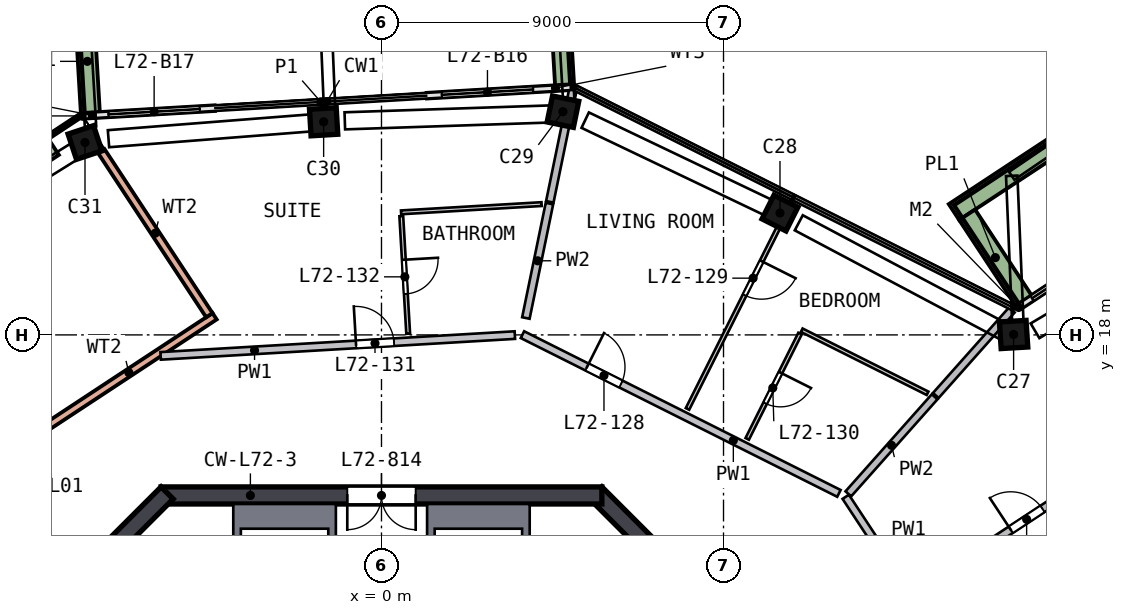
"""IFC4 building model, lengths in metres.
Left out: names, types, materials, properties, quantities, classifications, styles, units other than length and angle.
Written with IfcOpenShell. Run it as: python <this file> out.ifc"""

import sys

from ifc_helpers import new_model, si_unit, direction, frame, frame_2d, origin, origin_2d, place, context, subcontext, project, spatial, polyline, rectangle, outline, extrude, element, fill, save


model = new_model("IFC4")
c1 = context("Model", 3, precision=1e-05, world=origin(), true_north=direction((0.0, 1.0)))
c2 = subcontext(c1, "Body", "Model", "MODEL_VIEW")
j1 = project(units=[si_unit("LENGTHUNIT", "METRE"), si_unit("PLANEANGLEUNIT", "RADIAN")], contexts=[c1])
p1 = place(None, origin())
s1 = spatial("IfcSite", under=j1, at=p1, CompositionType="ELEMENT")
p2 = place(p1, origin())
s2 = spatial("IfcBuilding", under=s1, at=p2, CompositionType="ELEMENT")
p3 = place(p2, frame((0.0, 0.0, 291.5)))
s3 = spatial("IfcBuildingStorey", under=s2, at=p3, CompositionType="ELEMENT", Elevation=291.5)
p4 = place(p3, frame((16.737, 17.916, 0.0), z_axis=(-0.085818315, 0.078901161, 0.993181667), x_axis=(0.994621215, 0.064815395, 0.080793584)))
e1 = element("IfcColumn", 1, at=p4, inside=s3, PredefinedType="COLUMN", context=c2, shape_type="SweptSolid", body=[
    extrude(rectangle(XDim=0.7, YDim=0.7, at=origin_2d()), origin(), (0.0, 0.0, 1.0), 3.212),
])
p5 = place(p3, frame((10.608, 21.147, 0.0), z_axis=(-0.100992141, 0.049659539, 0.993647079), x_axis=(-0.88792749, 0.446004698, -0.112537025)))
e2 = element("IfcColumn", 2, at=p5, inside=s3, PredefinedType="COLUMN", context=c2, shape_type="SweptSolid", body=[
    extrude(rectangle(XDim=0.7, YDim=0.7, at=origin_2d()), origin(), (0.0, 0.0, 1.0), 3.21),
])
p6 = place(p3, frame((4.913, 23.847, 0.0), z_axis=(-0.113648817, 0.022425686, 0.993267857), x_axis=(0.972810168, -0.200555144, 0.115836137)))
e3 = element("IfcColumn", 3, at=p6, inside=s3, PredefinedType="COLUMN", context=c2, shape_type="SweptSolid", body=[
    extrude(rectangle(XDim=0.7, YDim=0.7, at=origin_2d()), origin(), (0.0, 0.0, 1.0), 3.212),
])
p7 = place(p3, frame((-1.387, 23.618, 0.0), z_axis=(-0.112247814, -0.007528817, 0.993651722), x_axis=(-0.991953134, -0.058082911, -0.112496023)))
e4 = element("IfcColumn", 4, at=p7, inside=s3, PredefinedType="COLUMN", context=c2, shape_type="SweptSolid", body=[
    extrude(rectangle(XDim=0.7, YDim=0.7, at=origin_2d()), origin(), (0.0, 0.0, 1.0), 3.21),
])
p8 = place(p3, frame((-7.669, 23.109, 0.0), z_axis=(-0.109619993, -0.037401551, 0.993269642), x_axis=(0.942748169, 0.312748183, 0.11582083)))
e5 = element("IfcColumn", 5, at=p8, inside=s3, PredefinedType="COLUMN", context=c2, shape_type="SweptSolid", body=[
    extrude(rectangle(XDim=0.7, YDim=0.7, at=origin_2d()), origin(), (0.0, 0.0, 1.0), 3.212),
])
p9 = place(p3, frame((13.841, 5.64, 0.0), z_axis=(0.0, 0.0, 1.0), x_axis=(-0.707106781, 0.707106781, 0.0)))
e6 = element("IfcWall", 6, at=p9, inside=s3, PredefinedType="SHEAR", context=c2, shape_type="SweptSolid", body=[
    extrude(rectangle(XDim=11.598, YDim=0.45, at=frame_2d((5.799, 0.0))), origin(), (0.0, 0.0, 1.0), 3.5),
])
p10 = place(p9, frame((2.099, 0.0, 0.0)))
e7 = element("IfcOpeningElement", 7, at=p10, cuts=e6, PredefinedType="OPENING", context=c2, shape_type="SweptSolid", body=[
    extrude(rectangle(XDim=1.2, YDim=2.1, at=frame_2d((0.6, 1.05))), frame((0.0, 0.235, 0.0), z_axis=(0.0, -1.0, 0.0), x_axis=(1.0, 0.0, 0.0)), (0.0, 0.0, 1.0), 0.47),
])
p11 = place(p3, frame((5.799, 13.775, 0.0), z_axis=(0.0, 0.0, 1.0), x_axis=(-1.0, 0.0, 0.0)))
e8 = element("IfcWall", 8, at=p11, inside=s3, PredefinedType="SHEAR", context=c2, shape_type="SweptSolid", body=[
    extrude(rectangle(XDim=11.598, YDim=0.45, at=frame_2d((5.799, 0.0))), origin(), (0.0, 0.0, 1.0), 3.5),
])
p12 = place(p11, frame((4.899, 0.0, 0.0)))
e9 = element("IfcOpeningElement", 9, at=p12, cuts=e8, PredefinedType="OPENING", context=c2, shape_type="SweptSolid", body=[
    extrude(rectangle(XDim=1.8, YDim=2.1, at=frame_2d((0.9, 1.05))), frame((0.0, 0.235, 0.0), z_axis=(0.0, -1.0, 0.0), x_axis=(1.0, 0.0, 0.0)), (0.0, 0.0, 1.0), 0.47),
])
p13 = place(p3, frame((-5.64, 13.841, 0.0), z_axis=(0.0, 0.0, 1.0), x_axis=(-0.707106781, -0.707106781, 0.0)))
e10 = element("IfcWall", 10, at=p13, inside=s3, PredefinedType="SHEAR", context=c2, shape_type="SweptSolid", body=[
    extrude(rectangle(XDim=11.598, YDim=0.45, at=frame_2d((5.799, 0.0))), origin(), (0.0, 0.0, 1.0), 3.5),
])
p14 = place(p3, frame((19.459, 20.504, 0.0), z_axis=(0.0, 0.0, 1.0), x_axis=(-0.83522898, -0.54990231, 0.0)))
e11 = element("IfcWall", 11, at=p14, inside=s3, PredefinedType="SOLIDWALL", context=c2, shape_type="SweptSolid", body=[
    extrude(rectangle(XDim=3.2, YDim=0.15, at=frame_2d((1.6, 0.0))), origin(), (0.0, 0.0, 1.0), 2.525),
])
p15 = place(p14, frame((0.4, 0.0, 0.0)))
e12 = element("IfcOpeningElement", 12, at=p15, cuts=e11, PredefinedType="OPENING", context=c2, shape_type="SweptSolid", body=[
    extrude(rectangle(XDim=2.4, YDim=2.4, at=frame_2d((1.2, 1.2))), frame((0.0, 0.085, 0.0), z_axis=(0.0, -1.0, 0.0), x_axis=(1.0, 0.0, 0.0)), (0.0, 0.0, 1.0), 0.17),
])
p16 = place(p3, frame((4.971, 24.517, 0.0), z_axis=(0.0, 0.0, 1.0), x_axis=(-0.998281258, -0.058604861, 0.0)))
e13 = element("IfcWall", 13, at=p16, inside=s3, PredefinedType="SOLIDWALL", context=c2, shape_type="SweptSolid", body=[
    extrude(rectangle(XDim=3.787, YDim=0.15, at=frame_2d((1.894, 0.0))), origin(), (0.0, 0.0, 1.0), 2.525),
])
p17 = place(p16, frame((0.987, 0.0, 0.0)))
e14 = element("IfcOpeningElement", 14, at=p17, cuts=e13, PredefinedType="OPENING", context=c2, shape_type="SweptSolid", body=[
    extrude(rectangle(XDim=2.4, YDim=2.4, at=frame_2d((1.2, 1.2))), frame((0.0, 0.085, 0.0), z_axis=(0.0, -1.0, 0.0), x_axis=(1.0, 0.0, 0.0)), (0.0, 0.0, 1.0), 0.17),
])
p18 = place(p3, frame((-4.385, 23.968, 0.0), z_axis=(0.0, 0.0, 1.0), x_axis=(-0.998282135, -0.058589922, 0.0)))
e15 = element("IfcWall", 15, at=p18, inside=s3, PredefinedType="SOLIDWALL", context=c2, shape_type="SweptSolid", body=[
    extrude(rectangle(XDim=3.467, YDim=0.15, at=frame_2d((1.733, 0.0))), origin(), (0.0, 0.0, 1.0), 2.525),
])
p19 = place(p18, frame((0.4, 0.0, 0.0)))
e16 = element("IfcOpeningElement", 16, at=p19, cuts=e15, PredefinedType="OPENING", context=c2, shape_type="SweptSolid", body=[
    extrude(rectangle(XDim=2.4, YDim=2.4, at=frame_2d((1.2, 1.2))), frame((0.0, 0.085, 0.0), z_axis=(0.0, -1.0, 0.0), x_axis=(1.0, 0.0, 0.0)), (0.0, 0.0, 1.0), 0.17),
])
p20 = place(p3, frame((27.633, 29.507, 0.0), z_axis=(0.0, 0.0, 1.0), x_axis=(-0.835233933, -0.549894788, 0.0)))
e17 = element("IfcWall", 17, at=p20, inside=s3, PredefinedType="SOLIDWALL", context=c2, shape_type="SweptSolid", body=[
    extrude(rectangle(XDim=15.048, YDim=0.5, at=frame_2d((7.524, 0.0))), origin(), (0.0, 0.0, 1.0), 0.7),
])
p21 = place(p3, frame((15.411, 21.161, 0.0), z_axis=(0.0, 0.0, 1.0), x_axis=(0.549910541, -0.835223561, 0.0)))
e18 = element("IfcWall", 18, at=p21, inside=s3, PredefinedType="SOLIDWALL", context=c2, shape_type="SweptSolid", body=[
    extrude(rectangle(XDim=2.699, YDim=0.5, at=frame_2d((1.35, 0.0))), origin(), (0.0, 0.0, 1.0), 0.7),
])
p22 = place(p3, frame((4.817, 24.584, 0.0), z_axis=(0.0, 0.0, 1.0), x_axis=(-0.058614646, 0.998280684, 0.0)))
e19 = element("IfcWall", 19, at=p22, inside=s3, PredefinedType="SOLIDWALL", context=c2, shape_type="SweptSolid", body=[
    extrude(rectangle(XDim=3.199, YDim=0.5, at=frame_2d((1.6, 0.0))), origin(), (0.0, 0.0, 1.0), 0.7),
])
p23 = place(p3, frame((-7.819, 26.546, 0.0), z_axis=(0.0, 0.0, 1.0), x_axis=(0.058615969, -0.998280606, 0.0)))
e20 = element("IfcWall", 20, at=p23, inside=s3, PredefinedType="SOLIDWALL", context=c2, shape_type="SweptSolid", body=[
    extrude(rectangle(XDim=2.699, YDim=0.5, at=frame_2d((1.35, 0.0))), origin(), (0.0, 0.0, 1.0), 0.7),
])
p24 = place(p3, frame((-15.249, 11.342, 0.0), z_axis=(0.0, 0.0, 1.0), x_axis=(0.835229141, 0.549902066, 0.0)))
e21 = element("IfcWall", 21, at=p24, inside=s3, PredefinedType="SOLIDWALL", context=c2, shape_type="SweptSolid", body=[
    extrude(rectangle(XDim=13.0, YDim=0.2, at=frame_2d((6.5, 0.0))), origin(), (0.0, 0.0, 1.0), 3.19),
])
p25 = place(p24, frame((5.6, 0.0, 0.0)))
e22 = element("IfcOpeningElement", 22, at=p25, cuts=e21, PredefinedType="OPENING", context=c2, shape_type="SweptSolid", body=[
    extrude(rectangle(XDim=1.8, YDim=2.4, at=frame_2d((0.9, 1.2))), frame((0.0, 0.11, 0.0), z_axis=(0.0, -1.0, 0.0), x_axis=(1.0, 0.0, 0.0)), (0.0, 0.0, 1.0), 0.22),
])
p26 = place(p3, frame((-7.373, 22.837, 0.0), z_axis=(0.0, 0.0, 1.0), x_axis=(0.549907016, -0.835225882, 0.0)))
e23 = element("IfcWall", 23, at=p26, inside=s3, PredefinedType="SOLIDWALL", context=c2, shape_type="SweptSolid", body=[
    extrude(rectangle(XDim=5.17, YDim=0.2, at=frame_2d((2.585, 0.0))), origin(), (0.0, 0.0, 1.0), 3.19),
])
p27 = place(p3, frame((-7.95, 23.75, 0.0), z_axis=(0.0, 0.0, 1.0), x_axis=(-0.83522795, -0.549903875, 0.0)))
e24 = element("IfcWall", 24, at=p27, inside=s3, PredefinedType="SOLIDWALL", context=c2, shape_type="SweptSolid", body=[
    extrude(rectangle(XDim=12.84, YDim=0.1, at=frame_2d((6.42, 0.0))), origin(), (0.0, 0.0, 1.0), 0.7),
])
p28 = place(p3, frame((-8.626, 22.946, 0.0), z_axis=(0.0, 0.0, 1.0), x_axis=(-0.835245259, -0.549877584, 0.0)))
e25 = element("IfcWall", 25, at=p28, inside=s3, PredefinedType="SOLIDWALL", context=c2, shape_type="SweptSolid", body=[
    extrude(rectangle(XDim=4.963, YDim=0.5, at=frame_2d((2.481, 0.0))), origin(), (0.0, 0.0, 1.0), 0.7),
])
p29 = place(p3, origin())
e26 = element("IfcWall", 26, at=p29, inside=s3, PredefinedType="SOLIDWALL", context=c2, shape_type="SweptSolid", body=[
    extrude(outline(polyline([(3.9, 9.9), (3.7, 9.9), (3.7, 12.9), (1.4, 12.9), (1.4, 9.9), (1.2, 9.9), (1.2, 13.55), (3.9, 13.55), (3.9, 9.9)])), origin(), (0.0, 0.0, 1.0), 3.19),
])
p30 = place(p3, origin())
e27 = element("IfcWall", 27, at=p30, inside=s3, PredefinedType="SOLIDWALL", context=c2, shape_type="SweptSolid", body=[
    extrude(outline(polyline([(-3.9, 13.55), (-1.2, 13.55), (-1.2, 9.9), (-1.4, 9.9), (-1.4, 12.9), (-3.7, 12.9), (-3.7, 9.9), (-3.9, 9.9), (-3.9, 13.55)])), origin(), (0.0, 0.0, 1.0), 3.19),
])
p31 = place(p3, frame((-5.811, 17.448, 0.0), z_axis=(0.0, 0.0, 1.0), x_axis=(0.998279959, 0.058626982, 0.0)))
e28 = element("IfcWall", 28, at=p31, inside=s3, PredefinedType="SOLIDWALL", context=c2, shape_type="SweptSolid", body=[
    extrude(rectangle(XDim=9.336, YDim=0.2, at=frame_2d((4.668, 0.0))), origin(), (0.0, 0.0, 1.0), 3.19),
])
p32 = place(p31, frame((5.15, 0.0, 0.0)))
e29 = element("IfcOpeningElement", 29, at=p32, cuts=e28, PredefinedType="OPENING", context=c2, shape_type="SweptSolid", body=[
    extrude(rectangle(XDim=1.0, YDim=2.1, at=frame_2d((0.5, 1.05))), frame((0.0, 0.11, 0.0), z_axis=(0.0, -1.0, 0.0), x_axis=(1.0, 0.0, 0.0)), (0.0, 0.0, 1.0), 0.22),
])
p33 = place(p3, frame((3.709, 18.007, 0.0), z_axis=(0.0, 0.0, 1.0), x_axis=(0.893855207, -0.448355739, 0.0)))
e30 = element("IfcWall", 30, at=p33, inside=s3, PredefinedType="SOLIDWALL", context=c2, shape_type="SweptSolid", body=[
    extrude(rectangle(XDim=9.317, YDim=0.2, at=frame_2d((4.658, 0.0))), origin(), (0.0, 0.0, 1.0), 3.19),
])
p34 = place(p33, frame((1.9, 0.0, 0.0)))
e31 = element("IfcOpeningElement", 31, at=p34, cuts=e30, PredefinedType="OPENING", context=c2, shape_type="SweptSolid", body=[
    extrude(rectangle(XDim=1.0, YDim=2.1, at=frame_2d((0.5, 1.05))), frame((0.0, 0.11, 0.0), z_axis=(0.0, -1.0, 0.0), x_axis=(1.0, 0.0, 0.0)), (0.0, 0.0, 1.0), 0.22),
])
p35 = place(p3, frame((12.216, 13.74, 0.0), z_axis=(0.0, 0.0, 1.0), x_axis=(0.549889366, -0.835237502, 0.0)))
e32 = element("IfcWall", 32, at=p35, inside=s3, PredefinedType="SOLIDWALL", context=c2, shape_type="SweptSolid", body=[
    extrude(rectangle(XDim=9.316, YDim=0.2, at=frame_2d((4.658, 0.0))), origin(), (0.0, 0.0, 1.0), 3.19),
])
p36 = place(p35, frame((3.863, 0.0, 0.0)))
e33 = element("IfcOpeningElement", 33, at=p36, cuts=e32, PredefinedType="OPENING", context=c2, shape_type="SweptSolid", body=[
    extrude(rectangle(XDim=1.8, YDim=2.1, at=frame_2d((0.9, 1.05))), frame((0.0, 0.11, 0.0), z_axis=(0.0, -1.0, 0.0), x_axis=(1.0, 0.0, 0.0)), (0.0, 0.0, 1.0), 0.22),
])
p37 = place(p3, frame((3.8, 18.445, 0.0), z_axis=(0.0, 0.0, 1.0), x_axis=(0.20174701, 0.979437667, 0.0)))
e34 = element("IfcWall", 34, at=p37, inside=s3, PredefinedType="SOLIDWALL", context=c2, shape_type="SweptSolid", body=[
    extrude(rectangle(XDim=3.075, YDim=0.2, at=frame_2d((1.538, 0.0))), origin(), (0.0, 0.0, 1.0), 3.19),
])
p38 = place(p3, frame((4.429, 21.501, 0.0), z_axis=(0.0, 0.0, 1.0), x_axis=(0.201787882, 0.979429248, 0.0)))
e35 = element("IfcWall", 35, at=p38, inside=s3, PredefinedType="SOLIDWALL", context=c2, shape_type="SweptSolid", body=[
    extrude(rectangle(XDim=3.011, YDim=0.2, at=frame_2d((1.506, 0.0))), origin(), (0.0, 0.0, 1.0), 3.19),
])
p39 = place(p3, frame((12.284, 13.817, 0.0), z_axis=(0.0, 0.0, 1.0), x_axis=(0.66447022, 0.747314744, 0.0)))
e36 = element("IfcWall", 36, at=p39, inside=s3, PredefinedType="SOLIDWALL", context=c2, shape_type="SweptSolid", body=[
    extrude(rectangle(XDim=3.418, YDim=0.2, at=frame_2d((1.709, 0.0))), origin(), (0.0, 0.0, 1.0), 3.19),
])
p40 = place(p3, frame((14.586, 16.406, 0.0), z_axis=(0.0, 0.0, 1.0), x_axis=(0.664464474, 0.747319853, 0.0)))
e37 = element("IfcWall", 37, at=p40, inside=s3, PredefinedType="SOLIDWALL", context=c2, shape_type="SweptSolid", body=[
    extrude(rectangle(XDim=3.011, YDim=0.2, at=frame_2d((1.506, 0.0))), origin(), (0.0, 0.0, 1.0), 3.19),
])
p41 = place(p3, frame((14.094, 11.25, 0.0), z_axis=(0.0, 0.0, 1.0), x_axis=(0.835242091, 0.549882395, 0.0)))
e38 = element("IfcWall", 38, at=p41, inside=s3, PredefinedType="SOLIDWALL", context=c2, shape_type="SweptSolid", body=[
    extrude(rectangle(XDim=10.252, YDim=0.2, at=frame_2d((5.126, 0.0))), origin(), (0.0, 0.0, 1.0), 3.19),
])
p42 = place(p41, frame((2.95, 0.0, 0.0)))
e39 = element("IfcOpeningElement", 39, at=p42, cuts=e38, PredefinedType="OPENING", context=c2, shape_type="SweptSolid", body=[
    extrude(rectangle(XDim=1.0, YDim=2.1, at=frame_2d((0.5, 1.05))), frame((0.0, 0.11, 0.0), z_axis=(0.0, -1.0, 0.0), x_axis=(1.0, 0.0, 0.0)), (0.0, 0.0, 1.0), 0.22),
])
p43 = place(p3, frame((24.522, 14.054, 0.0), z_axis=(0.0, 0.0, 1.0), x_axis=(-0.835223953, -0.549909946, 0.0)))
e40 = element("IfcWall", 40, at=p43, inside=s3, PredefinedType="SOLIDWALL", context=c2, shape_type="SweptSolid", body=[
    extrude(rectangle(XDim=10.252, YDim=0.2, at=frame_2d((5.126, 0.0))), origin(), (0.0, 0.0, 1.0), 3.19),
])
p44 = place(p43, frame((2.45, 0.0, 0.0)))
e41 = element("IfcOpeningElement", 41, at=p44, cuts=e40, PredefinedType="OPENING", context=c2, shape_type="SweptSolid", body=[
    extrude(rectangle(XDim=1.0, YDim=2.1, at=frame_2d((0.5, 1.05))), frame((0.0, 0.11, 0.0), z_axis=(0.0, -1.0, 0.0), x_axis=(1.0, 0.0, 0.0)), (0.0, 0.0, 1.0), 0.22),
])
p45 = place(p3, frame((0.521, 21.125, 0.0), z_axis=(0.0, 0.0, 1.0), x_axis=(0.05867124, -0.998277359, 0.0)))
e42 = element("IfcWall", 42, at=p45, inside=s3, PredefinedType="PARTITIONING", context=c2, shape_type="SweptSolid", body=[
    extrude(rectangle(XDim=3.1, YDim=0.1, at=frame_2d((1.55, 0.0))), origin(), (0.0, 0.0, 1.0), 3.19),
])
p46 = place(p45, frame((1.15, 0.0, 0.0)))
e43 = element("IfcOpeningElement", 43, at=p46, cuts=e42, PredefinedType="OPENING", context=c2, shape_type="SweptSolid", body=[
    extrude(rectangle(XDim=0.9, YDim=2.1, at=frame_2d((0.45, 1.05))), frame((0.0, 0.06, 0.0), z_axis=(0.0, -1.0, 0.0), x_axis=(1.0, 0.0, 0.0)), (0.0, 0.0, 1.0), 0.12),
])
p47 = place(p3, frame((0.515, 21.225, 0.0), z_axis=(0.0, 0.0, 1.0), x_axis=(0.998281865, 0.058594519, 0.0)))
e44 = element("IfcWall", 44, at=p47, inside=s3, PredefinedType="PARTITIONING", context=c2, shape_type="SweptSolid", body=[
    extrude(rectangle(XDim=3.704, YDim=0.1, at=frame_2d((1.852, 0.0))), origin(), (0.0, 0.0, 1.0), 3.19),
])
p48 = place(p3, frame((10.81, 21.549, 0.0), z_axis=(0.0, 0.0, 1.0), x_axis=(-0.448388269, -0.89383889, 0.0)))
e45 = element("IfcWall", 45, at=p48, inside=s3, PredefinedType="PARTITIONING", context=c2, shape_type="SweptSolid", body=[
    extrude(rectangle(XDim=6.15, YDim=0.1, at=frame_2d((3.075, 0.0))), origin(), (0.0, 0.0, 1.0), 3.19),
])
p49 = place(p48, frame((1.8, 0.0, 0.0)))
e46 = element("IfcOpeningElement", 46, at=p49, cuts=e45, PredefinedType="OPENING", context=c2, shape_type="SweptSolid", body=[
    extrude(rectangle(XDim=1.0, YDim=2.1, at=frame_2d((0.5, 1.05))), frame((0.0, 0.06, 0.0), z_axis=(0.0, -1.0, 0.0), x_axis=(1.0, 0.0, 0.0)), (0.0, 0.0, 1.0), 0.12),
])
p50 = place(p3, frame((11.014, 18.034, 0.0), z_axis=(0.0, 0.0, 1.0), x_axis=(-0.448410216, -0.89382788, 0.0)))
e47 = element("IfcWall", 47, at=p50, inside=s3, PredefinedType="PARTITIONING", context=c2, shape_type="SweptSolid", body=[
    extrude(rectangle(XDim=3.1, YDim=0.1, at=frame_2d((1.55, 0.0))), origin(), (0.0, 0.0, 1.0), 3.19),
])
p51 = place(p50, frame((1.15, 0.0, 0.0)))
e48 = element("IfcOpeningElement", 48, at=p51, cuts=e47, PredefinedType="OPENING", context=c2, shape_type="SweptSolid", body=[
    extrude(rectangle(XDim=0.9, YDim=2.1, at=frame_2d((0.45, 1.05))), frame((0.0, 0.06, 0.0), z_axis=(0.0, -1.0, 0.0), x_axis=(1.0, 0.0, 0.0)), (0.0, 0.0, 1.0), 0.12),
])
p52 = place(p3, frame((14.369, 16.463, 0.0), z_axis=(0.0, 0.0, 1.0), x_axis=(-0.893833196, 0.448399619, 0.0)))
e49 = element("IfcWall", 49, at=p52, inside=s3, PredefinedType="PARTITIONING", context=c2, shape_type="SweptSolid", body=[
    extrude(rectangle(XDim=3.704, YDim=0.1, at=frame_2d((1.852, 0.0))), origin(), (0.0, 0.0, 1.0), 3.19),
])
p53 = place(p15, origin())
e50 = element("IfcDoor", 50, at=p53, inside=s3, OperationType="SLIDING_TO_RIGHT", PredefinedType="DOOR", context=c2, shape_type="SweptSolid", body=[
    extrude(rectangle(XDim=2.4, YDim=2.4, at=frame_2d((1.2, 1.2))), frame((0.0, 0.025, 0.0), z_axis=(0.0, -1.0, 0.0), x_axis=(1.0, 0.0, 0.0)), (0.0, 0.0, 1.0), 0.05),
])
fill(e12, e50)
p54 = place(p17, origin())
e51 = element("IfcDoor", 51, at=p54, inside=s3, OperationType="SLIDING_TO_LEFT", PredefinedType="DOOR", context=c2, shape_type="SweptSolid", body=[
    extrude(rectangle(XDim=2.4, YDim=2.4, at=frame_2d((1.2, 1.2))), frame((0.0, 0.025, 0.0), z_axis=(0.0, -1.0, 0.0), x_axis=(1.0, 0.0, 0.0)), (0.0, 0.0, 1.0), 0.05),
])
fill(e14, e51)
p55 = place(p19, origin())
e52 = element("IfcDoor", 52, at=p55, inside=s3, OperationType="SLIDING_TO_RIGHT", PredefinedType="DOOR", context=c2, shape_type="SweptSolid", body=[
    extrude(rectangle(XDim=2.4, YDim=2.4, at=frame_2d((1.2, 1.2))), frame((0.0, 0.025, 0.0), z_axis=(0.0, -1.0, 0.0), x_axis=(1.0, 0.0, 0.0)), (0.0, 0.0, 1.0), 0.05),
])
fill(e16, e52)
p56 = place(p12, origin())
e53 = element("IfcDoor", 53, at=p56, inside=s3, OperationType="DOUBLE_DOOR_SINGLE_SWING", PredefinedType="DOOR", context=c2, shape_type="SweptSolid", body=[
    extrude(rectangle(XDim=1.8, YDim=2.1, at=frame_2d((0.9, 1.05))), frame((0.0, 0.025, 0.0), z_axis=(0.0, -1.0, 0.0), x_axis=(1.0, 0.0, 0.0)), (0.0, 0.0, 1.0), 0.05),
])
fill(e9, e53)
p57 = place(p42, origin())
e54 = element("IfcDoor", 54, at=p57, inside=s3, OperationType="SINGLE_SWING_LEFT", PredefinedType="DOOR", context=c2, shape_type="SweptSolid", body=[
    extrude(rectangle(XDim=1.0, YDim=2.1, at=frame_2d((0.5, 1.05))), frame((0.0, 0.025, 0.0), z_axis=(0.0, -1.0, 0.0), x_axis=(1.0, 0.0, 0.0)), (0.0, 0.0, 1.0), 0.05),
])
fill(e39, e54)
p58 = place(p34, origin())
e55 = element("IfcDoor", 55, at=p58, inside=s3, OperationType="SINGLE_SWING_LEFT", PredefinedType="DOOR", context=c2, shape_type="SweptSolid", body=[
    extrude(rectangle(XDim=1.0, YDim=2.1, at=frame_2d((0.5, 1.05))), frame((0.0, 0.025, 0.0), z_axis=(0.0, -1.0, 0.0), x_axis=(1.0, 0.0, 0.0)), (0.0, 0.0, 1.0), 0.05),
])
fill(e31, e55)
p59 = place(p49, origin())
e56 = element("IfcDoor", 56, at=p59, inside=s3, OperationType="SINGLE_SWING_LEFT", PredefinedType="DOOR", context=c2, shape_type="SweptSolid", body=[
    extrude(rectangle(XDim=1.0, YDim=2.1, at=frame_2d((0.5, 1.05))), frame((0.0, 0.025, 0.0), z_axis=(0.0, -1.0, 0.0), x_axis=(1.0, 0.0, 0.0)), (0.0, 0.0, 1.0), 0.05),
])
fill(e46, e56)
p60 = place(p51, origin())
e57 = element("IfcDoor", 57, at=p60, inside=s3, OperationType="SINGLE_SWING_LEFT", PredefinedType="DOOR", context=c2, shape_type="SweptSolid", body=[
    extrude(rectangle(XDim=0.9, YDim=2.1, at=frame_2d((0.45, 1.05))), frame((0.0, 0.025, 0.0), z_axis=(0.0, -1.0, 0.0), x_axis=(1.0, 0.0, 0.0)), (0.0, 0.0, 1.0), 0.05),
])
fill(e48, e57)
p61 = place(p32, origin())
e58 = element("IfcDoor", 58, at=p61, inside=s3, OperationType="SINGLE_SWING_LEFT", PredefinedType="DOOR", context=c2, shape_type="SweptSolid", body=[
    extrude(rectangle(XDim=1.0, YDim=2.1, at=frame_2d((0.5, 1.05))), frame((0.0, 0.025, 0.0), z_axis=(0.0, -1.0, 0.0), x_axis=(1.0, 0.0, 0.0)), (0.0, 0.0, 1.0), 0.05),
])
fill(e29, e58)
p62 = place(p46, origin())
e59 = element("IfcDoor", 59, at=p62, inside=s3, OperationType="SINGLE_SWING_LEFT", PredefinedType="DOOR", context=c2, shape_type="SweptSolid", body=[
    extrude(rectangle(XDim=0.9, YDim=2.1, at=frame_2d((0.45, 1.05))), frame((0.0, 0.025, 0.0), z_axis=(0.0, -1.0, 0.0), x_axis=(1.0, 0.0, 0.0)), (0.0, 0.0, 1.0), 0.05),
])
fill(e43, e59)
save(model, sys.argv[1])
